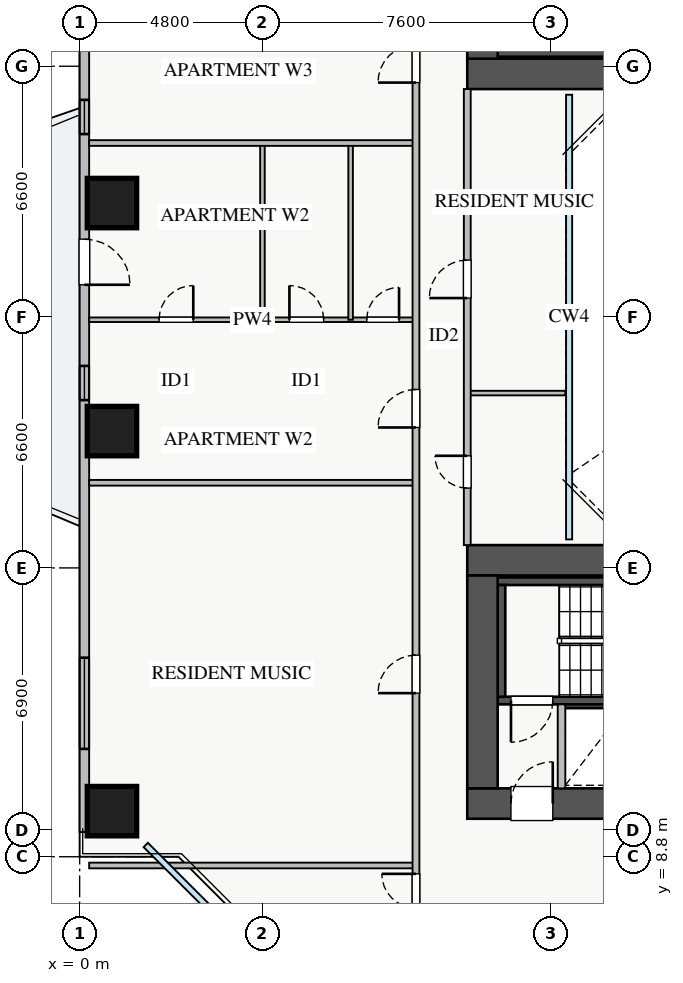
"""IFC4 building model, lengths in metres.
Left out: names, types, materials, properties, quantities, classifications, styles, units other than length and angle.
Written with IfcOpenShell. Run it as: python <this file> out.ifc"""

import sys

from ifc_helpers import new_model, si_unit, direction, frame, frame_2d, origin, origin_2d, place, context, subcontext, project, spatial, rectangle, extrude, source, transform, mapped, element, fill, save


model = new_model("IFC4")
c1 = context("Model", 3, precision=1e-05, world=origin(), true_north=direction((0.0, 1.0)))
c2 = subcontext(c1, "Body", "Model", "MODEL_VIEW")
j1 = project(units=[si_unit("LENGTHUNIT", "METRE"), si_unit("PLANEANGLEUNIT", "RADIAN")], contexts=[c1])
p1 = place(None, origin())
s1 = spatial("IfcSite", under=j1, at=p1, CompositionType="ELEMENT")
p2 = place(p1, origin())
s2 = spatial("IfcBuilding", under=s1, at=p2, CompositionType="ELEMENT")
p3 = place(p2, frame((0.0, 0.0, 79.5)))
s3 = spatial("IfcBuildingStorey", under=s2, at=p3, CompositionType="ELEMENT", Elevation=79.5)
p4 = place(p3, frame((12.68, 12.8, 0.0), z_axis=(0.0, 0.0, 1.0), x_axis=(1.0, 0.0, 0.0)))
e1 = element("IfcWall", 1, at=p4, inside=s3, PredefinedType="SHEAR", context=c2, shape_type="SweptSolid", body=[
    extrude(rectangle(XDim=1.94, YDim=0.18, at=frame_2d((0.97, 0.0))), origin(), (0.0, 0.0, 1.0), 3.07),
])
p5 = place(p3, frame((11.0, 29.95, 0.0), z_axis=(0.0, 0.0, 1.0), x_axis=(1.0, 0.0, 0.0)))
e2 = element("IfcWall", 2, at=p5, inside=s3, PredefinedType="SHEAR", context=c2, shape_type="SweptSolid", body=[
    extrude(rectangle(XDim=7.15, YDim=0.2, at=frame_2d((3.575, 0.0))), origin(), (0.0, 0.0, 1.0), 3.25),
])
p6 = place(p3, frame((11.0, 12.91, 0.0), z_axis=(0.0, 0.0, 1.0), x_axis=(1.0, 0.0, 0.0)))
e3 = element("IfcWall", 3, at=p6, inside=s3, PredefinedType="SHEAR", context=c2, shape_type="SweptSolid", body=[
    extrude(rectangle(XDim=7.15, YDim=0.2, at=frame_2d((3.575, 0.0))), origin(), (0.0, 0.0, 1.0), 3.25),
])
p7 = place(p6, frame((0.35, 0.0, 0.0)))
e4 = element("IfcOpeningElement", 4, at=p7, cuts=e3, PredefinedType="OPENING", context=c2, shape_type="SweptSolid", body=[
    extrude(rectangle(XDim=1.1, YDim=2.05, at=frame_2d((0.55, 1.025))), frame((0.0, 0.11, 0.0), z_axis=(0.0, -1.0, 0.0), x_axis=(1.0, 0.0, 0.0)), (0.0, 0.0, 1.0), 0.22),
])
p8 = place(p3, frame((11.0, 16.05, 0.0), z_axis=(0.0, 0.0, 1.0), x_axis=(1.0, 0.0, 0.0)))
e5 = element("IfcWall", 5, at=p8, inside=s3, PredefinedType="SHEAR", context=c2, shape_type="SweptSolid", body=[
    extrude(rectangle(XDim=7.15, YDim=0.2, at=frame_2d((3.575, 0.0))), origin(), (0.0, 0.0, 1.0), 3.25),
])
p9 = place(p3, frame((11.1, 13.01, 0.0), z_axis=(0.0, 0.0, 1.0), x_axis=(0.0, 1.0, 0.0)))
e6 = element("IfcWall", 6, at=p9, inside=s3, PredefinedType="SHEAR", context=c2, shape_type="SweptSolid", body=[
    extrude(rectangle(XDim=2.94, YDim=0.2, at=frame_2d((1.47, 0.0))), origin(), (0.0, 0.0, 1.0), 3.25),
])
p10 = place(p3, frame((10.2, 29.4, 0.0), z_axis=(0.0, 0.0, 1.0), x_axis=(1.0, 0.0, 0.0)))
e7 = element("IfcWall", 7, at=p10, inside=s3, PredefinedType="SHEAR", context=c2, shape_type="SweptSolid", body=[
    extrude(rectangle(XDim=17.6, YDim=0.8, at=frame_2d((8.8, 0.0))), origin(), (0.0, 0.0, 1.0), 3.25),
])
p11 = place(p3, frame((10.6, 29.8, 0.0), z_axis=(0.0, 0.0, 1.0), x_axis=(0.0, 1.0, 0.0)))
e8 = element("IfcWall", 8, at=p11, inside=s3, PredefinedType="SHEAR", context=c2, shape_type="SweptSolid", body=[
    extrude(rectangle(XDim=5.6, YDim=0.8, at=frame_2d((2.8, 0.0))), origin(), (0.0, 0.0, 1.0), 3.25),
])
p12 = place(p3, frame((10.2, 10.2, 0.0), z_axis=(0.0, 0.0, 1.0), x_axis=(1.0, 0.0, 0.0)))
e9 = element("IfcWall", 9, at=p12, inside=s3, PredefinedType="SHEAR", context=c2, shape_type="SweptSolid", body=[
    extrude(rectangle(XDim=17.6, YDim=0.8, at=frame_2d((8.8, 0.0))), origin(), (0.0, 0.0, 1.0), 3.25),
])
p13 = place(p12, frame((1.15, 0.0, 0.0)))
e10 = element("IfcOpeningElement", 10, at=p13, cuts=e9, PredefinedType="OPENING", context=c2, shape_type="SweptSolid", body=[
    extrude(rectangle(XDim=1.1, YDim=2.05, at=frame_2d((0.55, 1.025))), frame((0.0, 0.41, 0.0), z_axis=(0.0, -1.0, 0.0), x_axis=(1.0, 0.0, 0.0)), (0.0, 0.0, 1.0), 0.82),
])
p14 = place(p12, frame((8.3, 0.0, 0.0)))
e11 = element("IfcOpeningElement", 11, at=p14, cuts=e9, PredefinedType="OPENING", context=c2, shape_type="SweptSolid", body=[
    extrude(rectangle(XDim=1.1, YDim=2.05, at=frame_2d((0.55, 1.025))), frame((0.0, 0.41, 0.0), z_axis=(0.0, -1.0, 0.0), x_axis=(1.0, 0.0, 0.0)), (0.0, 0.0, 1.0), 0.82),
])
p15 = place(p12, frame((10.05, 0.0, 0.0)))
e12 = element("IfcOpeningElement", 12, at=p15, cuts=e9, PredefinedType="OPENING", context=c2, shape_type="SweptSolid", body=[
    extrude(rectangle(XDim=1.1, YDim=2.05, at=frame_2d((0.55, 1.025))), frame((0.0, 0.41, 0.0), z_axis=(0.0, -1.0, 0.0), x_axis=(1.0, 0.0, 0.0)), (0.0, 0.0, 1.0), 0.82),
])
p16 = place(p12, frame((14.74, 0.0, 0.0)))
e13 = element("IfcOpeningElement", 13, at=p16, cuts=e9, PredefinedType="OPENING", context=c2, shape_type="SweptSolid", body=[
    extrude(rectangle(XDim=1.0, YDim=2.05, at=frame_2d((0.5, 1.025))), frame((0.0, 0.41, 0.0), z_axis=(0.0, -1.0, 0.0), x_axis=(1.0, 0.0, 0.0)), (0.0, 0.0, 1.0), 0.82),
])
p17 = place(p12, frame((12.585, 0.0, 0.0)))
e14 = element("IfcOpeningElement", 14, at=p17, cuts=e9, PredefinedType="OPENING", context=c2, shape_type="SweptSolid", body=[
    extrude(rectangle(XDim=1.0, YDim=2.05, at=frame_2d((0.5, 1.025))), frame((0.0, 0.41, 0.0), z_axis=(0.0, -1.0, 0.0), x_axis=(1.0, 0.0, 0.0)), (0.0, 0.0, 1.0), 0.82),
])
p18 = place(p3, frame((10.2, 16.6, 0.0), z_axis=(0.0, 0.0, 1.0), x_axis=(1.0, 0.0, 0.0)))
e15 = element("IfcWall", 15, at=p18, inside=s3, PredefinedType="SHEAR", context=c2, shape_type="SweptSolid", body=[
    extrude(rectangle(XDim=17.6, YDim=0.8, at=frame_2d((8.8, 0.0))), origin(), (0.0, 0.0, 1.0), 3.25),
])
p19 = place(p3, frame((10.6, 10.6, 0.0), z_axis=(0.0, 0.0, 1.0), x_axis=(0.0, 1.0, 0.0)))
e16 = element("IfcWall", 16, at=p19, inside=s3, PredefinedType="SHEAR", context=c2, shape_type="SweptSolid", body=[
    extrude(rectangle(XDim=5.6, YDim=0.8, at=frame_2d((2.8, 0.0))), origin(), (0.0, 0.0, 1.0), 3.25),
])
m1 = source(origin(), c2, "Body", "SweptSolid", [
    extrude(rectangle(XDim=1.3, YDim=1.3, at=origin_2d()), origin(), (0.0, 0.0, 1.0), 3.25),
])
for number, where, z_axis, x_axis in (
    (17, (0.85, 26.0, 0.0), (0.0, 0.0, 1.0), (1.0, 0.0, 0.0)),
    (18, (0.85, 20.0, 0.0), (0.0, 0.0, 1.0), (1.0, 0.0, 0.0)),
    (19, (0.85, 10.0, 0.0), (0.0, 0.0, 1.0), (1.0, 0.0, 0.0)),
):
    element("IfcColumn", number, at=place(p3, frame(where, z_axis=z_axis, x_axis=x_axis)), inside=s3, PredefinedType="COLUMN", context=c2, shape_type="MappedRepresentation", body=[
        mapped(m1, transform((0.0, 0.0, 0.0), x_axis=(1.0, 0.0, 0.0), y_axis=(0.0, 1.0, 0.0), z_axis=(0.0, 0.0, 1.0), scale=1.0)),
    ])
p20 = place(p3, frame((0.125, 9.45, 0.0), z_axis=(0.0, 0.0, 1.0), x_axis=(0.0, 1.0, 0.0)))
e20 = element("IfcWall", 20, at=p20, inside=s3, PredefinedType="STANDARD", context=c2, shape_type="SweptSolid", body=[
    extrude(rectangle(XDim=27.1, YDim=0.25, at=frame_2d((13.55, 0.0))), origin(), (0.0, 0.0, 1.0), 2.61),
])
p21 = place(p20, frame((14.4, 0.0, 0.0)))
e21 = element("IfcOpeningElement", 21, at=p21, cuts=e20, PredefinedType="OPENING", context=c2, shape_type="SweptSolid", body=[
    extrude(rectangle(XDim=1.2, YDim=2.1, at=frame_2d((0.6, 1.05))), frame((0.0, 0.135, 0.0), z_axis=(0.0, -1.0, 0.0), x_axis=(1.0, 0.0, 0.0)), (0.0, 0.0, 1.0), 0.27),
])
p22 = place(p20, frame((2.188, 0.0, 0.9)))
e22 = element("IfcOpeningElement", 22, at=p22, cuts=e20, PredefinedType="OPENING", context=c2, shape_type="SweptSolid", body=[
    extrude(rectangle(XDim=2.4, YDim=1.48, at=frame_2d((1.2, 0.74))), frame((0.0, 0.135, 0.0), z_axis=(0.0, -1.0, 0.0), x_axis=(1.0, 0.0, 0.0)), (0.0, 0.0, 1.0), 0.27),
])
p23 = place(p20, frame((23.272, 0.0, 0.9)))
e23 = element("IfcOpeningElement", 23, at=p23, cuts=e20, PredefinedType="OPENING", context=c2, shape_type="SweptSolid", body=[
    extrude(rectangle(XDim=2.1, YDim=1.5, at=frame_2d((1.05, 0.75))), frame((0.0, 0.135, 0.0), z_axis=(0.0, -1.0, 0.0), x_axis=(1.0, 0.0, 0.0)), (0.0, 0.0, 1.0), 0.27),
])
p24 = place(p20, frame((11.365, 0.0, 0.9)))
e24 = element("IfcOpeningElement", 24, at=p24, cuts=e20, PredefinedType="OPENING", context=c2, shape_type="SweptSolid", body=[
    extrude(rectangle(XDim=0.9, YDim=1.2, at=frame_2d((0.45, 0.6))), frame((0.0, 0.135, 0.0), z_axis=(0.0, -1.0, 0.0), x_axis=(1.0, 0.0, 0.0)), (0.0, 0.0, 1.0), 0.27),
])
p25 = place(p20, frame((18.365, 0.0, 0.9)))
e25 = element("IfcOpeningElement", 25, at=p25, cuts=e20, PredefinedType="OPENING", context=c2, shape_type="SweptSolid", body=[
    extrude(rectangle(XDim=0.9, YDim=1.2, at=frame_2d((0.45, 0.6))), frame((0.0, 0.135, 0.0), z_axis=(0.0, -1.0, 0.0), x_axis=(1.0, 0.0, 0.0)), (0.0, 0.0, 1.0), 0.27),
])
p26 = place(p3, frame((12.68, 10.6, 0.0), z_axis=(0.0, 0.0, 1.0), x_axis=(0.0, 1.0, 0.0)))
e26 = element("IfcWall", 26, at=p26, inside=s3, PredefinedType="PARTITIONING", context=c2, shape_type="SweptSolid", body=[
    extrude(rectangle(XDim=2.21, YDim=0.2, at=frame_2d((1.105, 0.0))), origin(), (0.0, 0.0, 1.0), 3.07),
])
p27 = place(p3, frame((0.25, 8.57, 0.0), z_axis=(0.0, 0.0, 1.0), x_axis=(1.0, 0.0, 0.0)))
e27 = element("IfcWall", 27, at=p27, inside=s3, PredefinedType="PARTITIONING", context=c2, shape_type="SweptSolid", body=[
    extrude(rectangle(XDim=8.6, YDim=0.15, at=frame_2d((4.3, 0.0))), origin(), (0.0, 0.0, 1.0), 3.07),
])
p28 = place(p3, frame((0.25, 22.93, 0.0), z_axis=(0.0, 0.0, 1.0), x_axis=(1.0, 0.0, 0.0)))
e28 = element("IfcWall", 28, at=p28, inside=s3, PredefinedType="PLUMBINGWALL", context=c2, shape_type="SweptSolid", body=[
    extrude(rectangle(XDim=8.6, YDim=0.12, at=frame_2d((4.3, 0.0))), origin(), (0.0, 0.0, 1.0), 3.07),
])
p29 = place(p28, frame((1.84, 0.0, 0.0)))
e29 = element("IfcOpeningElement", 29, at=p29, cuts=e28, PredefinedType="OPENING", context=c2, shape_type="SweptSolid", body=[
    extrude(rectangle(XDim=0.9, YDim=2.05, at=frame_2d((0.45, 1.025))), frame((0.0, 0.07, 0.0), z_axis=(0.0, -1.0, 0.0), x_axis=(1.0, 0.0, 0.0)), (0.0, 0.0, 1.0), 0.14),
])
p30 = place(p28, frame((5.27, 0.0, 0.0)))
e30 = element("IfcOpeningElement", 30, at=p30, cuts=e28, PredefinedType="OPENING", context=c2, shape_type="SweptSolid", body=[
    extrude(rectangle(XDim=0.9, YDim=2.05, at=frame_2d((0.45, 1.025))), frame((0.0, 0.07, 0.0), z_axis=(0.0, -1.0, 0.0), x_axis=(1.0, 0.0, 0.0)), (0.0, 0.0, 1.0), 0.14),
])
p31 = place(p28, frame((7.305, 0.0, 0.0)))
e31 = element("IfcOpeningElement", 31, at=p31, cuts=e28, PredefinedType="OPENING", context=c2, shape_type="SweptSolid", body=[
    extrude(rectangle(XDim=0.85, YDim=2.05, at=frame_2d((0.425, 1.025))), frame((0.0, 0.07, 0.0), z_axis=(0.0, -1.0, 0.0), x_axis=(1.0, 0.0, 0.0)), (0.0, 0.0, 1.0), 0.14),
])
for number, where, z_axis, x_axis in (
    (32, (4.81, 22.93, 0.0), (0.0, 0.0, 1.0), (0.0, 1.0, 0.0)),
    (33, (7.13, 22.93, 0.0), (0.0, 0.0, 1.0), (0.0, 1.0, 0.0)),
):
    element("IfcWall", number, at=place(p3, frame(where, z_axis=z_axis, x_axis=x_axis)), inside=s3, PredefinedType="PLUMBINGWALL", context=c2, shape_type="SweptSolid", body=[
        extrude(rectangle(XDim=4.65, YDim=0.12, at=frame_2d((2.325, 0.0))), origin(), (0.0, 0.0, 1.0), 3.07),
    ])
for number, where, z_axis, x_axis in (
    (34, (0.25, 18.64, 0.0), (0.0, 0.0, 1.0), (1.0, 0.0, 0.0)),
    (35, (0.25, 27.58, 0.0), (0.0, 0.0, 1.0), (1.0, 0.0, 0.0)),
):
    element("IfcWall", number, at=place(p3, frame(where, z_axis=z_axis, x_axis=x_axis)), inside=s3, PredefinedType="PARTITIONING", context=c2, shape_type="SweptSolid", body=[
        extrude(rectangle(XDim=8.6, YDim=0.15, at=frame_2d((4.3, 0.0))), origin(), (0.0, 0.0, 1.0), 3.07),
    ])
p32 = place(p3, frame((8.85, 7.21, 0.0), z_axis=(0.0, 0.0, 1.0), x_axis=(0.0, 1.0, 0.0)))
e36 = element("IfcWall", 36, at=p32, inside=s3, PredefinedType="PARTITIONING", context=c2, shape_type="SweptSolid", body=[
    extrude(rectangle(XDim=31.23, YDim=0.18, at=frame_2d((15.615, 0.0))), origin(), (0.0, 0.0, 1.0), 3.07),
])
p33 = place(p32, frame((30.09, 0.0, 0.0)))
e37 = element("IfcOpeningElement", 37, at=p33, cuts=e36, PredefinedType="OPENING", context=c2, shape_type="SweptSolid", body=[
    extrude(rectangle(XDim=0.9, YDim=2.05, at=frame_2d((0.45, 1.025))), frame((0.0, 0.1, 0.0), z_axis=(0.0, -1.0, 0.0), x_axis=(1.0, 0.0, 0.0)), (0.0, 0.0, 1.0), 0.2),
])
p34 = place(p32, frame((0.24, 0.0, 0.0)))
e38 = element("IfcOpeningElement", 38, at=p34, cuts=e36, PredefinedType="OPENING", context=c2, shape_type="SweptSolid", body=[
    extrude(rectangle(XDim=0.9, YDim=2.05, at=frame_2d((0.45, 1.025))), frame((0.0, 0.1, 0.0), z_axis=(0.0, -1.0, 0.0), x_axis=(1.0, 0.0, 0.0)), (0.0, 0.0, 1.0), 0.2),
])
p35 = place(p32, frame((5.895, 0.0, 0.0)))
e39 = element("IfcOpeningElement", 39, at=p35, cuts=e36, PredefinedType="OPENING", context=c2, shape_type="SweptSolid", body=[
    extrude(rectangle(XDim=1.0, YDim=2.05, at=frame_2d((0.5, 1.025))), frame((0.0, 0.1, 0.0), z_axis=(0.0, -1.0, 0.0), x_axis=(1.0, 0.0, 0.0)), (0.0, 0.0, 1.0), 0.2),
])
p36 = place(p32, frame((12.885, 0.0, 0.0)))
e40 = element("IfcOpeningElement", 40, at=p36, cuts=e36, PredefinedType="OPENING", context=c2, shape_type="SweptSolid", body=[
    extrude(rectangle(XDim=1.0, YDim=2.05, at=frame_2d((0.5, 1.025))), frame((0.0, 0.1, 0.0), z_axis=(0.0, -1.0, 0.0), x_axis=(1.0, 0.0, 0.0)), (0.0, 0.0, 1.0), 0.2),
])
p37 = place(p32, frame((21.96, 0.0, 0.0)))
e41 = element("IfcOpeningElement", 41, at=p37, cuts=e36, PredefinedType="OPENING", context=c2, shape_type="SweptSolid", body=[
    extrude(rectangle(XDim=1.0, YDim=2.05, at=frame_2d((0.5, 1.025))), frame((0.0, 0.1, 0.0), z_axis=(0.0, -1.0, 0.0), x_axis=(1.0, 0.0, 0.0)), (0.0, 0.0, 1.0), 0.2),
])
p38 = place(p3, frame((10.2, 21.0, 0.0), z_axis=(0.0, 0.0, 1.0), x_axis=(1.0, 0.0, 0.0)))
e42 = element("IfcWall", 42, at=p38, inside=s3, PredefinedType="PLUMBINGWALL", context=c2, shape_type="SweptSolid", body=[
    extrude(rectangle(XDim=2.58, YDim=0.12, at=frame_2d((1.29, 0.0))), origin(), (0.0, 0.0, 1.0), 3.07),
])
p39 = place(p3, frame((10.2, 17.0, 0.0), z_axis=(0.0, 0.0, 1.0), x_axis=(0.0, 1.0, 0.0)))
e43 = element("IfcWall", 43, at=p39, inside=s3, PredefinedType="PARTITIONING", context=c2, shape_type="SweptSolid", body=[
    extrude(rectangle(XDim=12.0, YDim=0.18, at=frame_2d((6.0, 0.0))), origin(), (0.0, 0.0, 1.0), 3.07),
])
p40 = place(p39, frame((1.5, 0.0, 0.0)))
e44 = element("IfcOpeningElement", 44, at=p40, cuts=e43, PredefinedType="OPENING", context=c2, shape_type="SweptSolid", body=[
    extrude(rectangle(XDim=0.85, YDim=2.05, at=frame_2d((0.425, 1.025))), frame((0.0, 0.1, 0.0), z_axis=(0.0, -1.0, 0.0), x_axis=(1.0, 0.0, 0.0)), (0.0, 0.0, 1.0), 0.2),
])
p41 = place(p39, frame((6.5, 0.0, 0.0)))
e45 = element("IfcOpeningElement", 45, at=p41, cuts=e43, PredefinedType="OPENING", context=c2, shape_type="SweptSolid", body=[
    extrude(rectangle(XDim=1.0, YDim=2.05, at=frame_2d((0.5, 1.025))), frame((0.0, 0.1, 0.0), z_axis=(0.0, -1.0, 0.0), x_axis=(1.0, 0.0, 0.0)), (0.0, 0.0, 1.0), 0.2),
])
m2 = source(origin(), c2, "Body", "SweptSolid", [
    extrude(rectangle(XDim=1.2, YDim=2.1, at=frame_2d((0.6, 1.05))), frame((0.0, 0.025, 0.0), z_axis=(0.0, -1.0, 0.0), x_axis=(1.0, 0.0, 0.0)), (0.0, 0.0, 1.0), 0.05),
])
p42 = place(p21, frame((1.2, 0.0, 0.0), z_axis=(0.0, 0.0, 1.0), x_axis=(-1.0, 0.0, 0.0)))
e46 = element("IfcDoor", 46, at=p42, inside=s3, OperationType="SINGLE_SWING_LEFT", PredefinedType="DOOR", context=c2, shape_type="MappedRepresentation", body=[
    mapped(m2, transform((0.0, 0.0, 0.0), x_axis=(1.0, 0.0, 0.0), y_axis=(0.0, 1.0, 0.0), z_axis=(0.0, 0.0, 1.0), scale=1.0)),
])
fill(e21, e46)
m3 = source(origin(), c2, "Body", "SweptSolid", [
    extrude(rectangle(XDim=2.4, YDim=1.48, at=frame_2d((1.2, 0.74))), frame((0.0, 0.03, 0.0), z_axis=(0.0, -1.0, 0.0), x_axis=(1.0, 0.0, 0.0)), (0.0, 0.0, 1.0), 0.06),
])
p43 = place(p22, origin())
e47 = element("IfcWindow", 47, at=p43, inside=s3, PartitioningType="TRIPLE_PANEL_VERTICAL", PredefinedType="WINDOW", context=c2, shape_type="MappedRepresentation", body=[
    mapped(m3, transform((0.0, 0.0, 0.0), x_axis=(1.0, 0.0, 0.0), y_axis=(0.0, 1.0, 0.0), z_axis=(0.0, 0.0, 1.0), scale=1.0)),
])
fill(e22, e47)
m4 = source(origin(), c2, "Body", "SweptSolid", [
    extrude(rectangle(XDim=1.1, YDim=2.05, at=frame_2d((0.55, 1.025))), frame((0.0, 0.025, 0.0), z_axis=(0.0, -1.0, 0.0), x_axis=(1.0, 0.0, 0.0)), (0.0, 0.0, 1.0), 0.05),
])
p44 = place(p13, origin())
e48 = element("IfcDoor", 48, at=p44, inside=s3, OperationType="SINGLE_SWING_RIGHT", PredefinedType="DOOR", context=c2, shape_type="MappedRepresentation", body=[
    mapped(m4, transform((0.0, 0.0, 0.0), x_axis=(1.0, 0.0, 0.0), y_axis=(0.0, 1.0, 0.0), z_axis=(0.0, 0.0, 1.0), scale=1.0)),
])
fill(e10, e48)
p45 = place(p7, frame((1.1, 0.0, 0.0), z_axis=(0.0, 0.0, 1.0), x_axis=(-1.0, 0.0, 0.0)))
e49 = element("IfcDoor", 49, at=p45, inside=s3, OperationType="SINGLE_SWING_LEFT", PredefinedType="DOOR", context=c2, shape_type="MappedRepresentation", body=[
    mapped(m4, transform((0.0, 0.0, 0.0), x_axis=(1.0, 0.0, 0.0), y_axis=(0.0, 1.0, 0.0), z_axis=(0.0, 0.0, 1.0), scale=1.0)),
])
fill(e4, e49)
m5 = source(origin(), c2, "Body", "SweptSolid", [
    extrude(rectangle(XDim=0.9, YDim=2.05, at=frame_2d((0.45, 1.025))), frame((0.0, 0.025, 0.0), z_axis=(0.0, -1.0, 0.0), x_axis=(1.0, 0.0, 0.0)), (0.0, 0.0, 1.0), 0.05),
])
p46 = place(p29, origin())
e50 = element("IfcDoor", 50, at=p46, inside=s3, OperationType="SINGLE_SWING_RIGHT", PredefinedType="DOOR", context=c2, shape_type="MappedRepresentation", body=[
    mapped(m5, transform((0.0, 0.0, 0.0), x_axis=(1.0, 0.0, 0.0), y_axis=(0.0, 1.0, 0.0), z_axis=(0.0, 0.0, 1.0), scale=1.0)),
])
fill(e29, e50)
p47 = place(p30, origin())
e51 = element("IfcDoor", 51, at=p47, inside=s3, OperationType="SINGLE_SWING_LEFT", PredefinedType="DOOR", context=c2, shape_type="MappedRepresentation", body=[
    mapped(m5, transform((0.0, 0.0, 0.0), x_axis=(1.0, 0.0, 0.0), y_axis=(0.0, 1.0, 0.0), z_axis=(0.0, 0.0, 1.0), scale=1.0)),
])
fill(e30, e51)
m6 = source(origin(), c2, "Body", "SweptSolid", [
    extrude(rectangle(XDim=0.85, YDim=2.05, at=frame_2d((0.425, 1.025))), frame((0.0, 0.025, 0.0), z_axis=(0.0, -1.0, 0.0), x_axis=(1.0, 0.0, 0.0)), (0.0, 0.0, 1.0), 0.05),
])
p48 = place(p31, origin())
e52 = element("IfcDoor", 52, at=p48, inside=s3, OperationType="SINGLE_SWING_RIGHT", PredefinedType="DOOR", context=c2, shape_type="MappedRepresentation", body=[
    mapped(m6, transform((0.0, 0.0, 0.0), x_axis=(1.0, 0.0, 0.0), y_axis=(0.0, 1.0, 0.0), z_axis=(0.0, 0.0, 1.0), scale=1.0)),
])
fill(e31, e52)
p49 = place(p34, origin())
e53 = element("IfcDoor", 53, at=p49, inside=s3, OperationType="SINGLE_SWING_RIGHT", PredefinedType="DOOR", context=c2, shape_type="MappedRepresentation", body=[
    mapped(m5, transform((0.0, 0.0, 0.0), x_axis=(1.0, 0.0, 0.0), y_axis=(0.0, 1.0, 0.0), z_axis=(0.0, 0.0, 1.0), scale=1.0)),
])
fill(e38, e53)
m7 = source(origin(), c2, "Body", "SweptSolid", [
    extrude(rectangle(XDim=1.0, YDim=2.05, at=frame_2d((0.5, 1.025))), frame((0.0, 0.025, 0.0), z_axis=(0.0, -1.0, 0.0), x_axis=(1.0, 0.0, 0.0)), (0.0, 0.0, 1.0), 0.05),
])
p50 = place(p35, origin())
e54 = element("IfcDoor", 54, at=p50, inside=s3, OperationType="SINGLE_SWING_LEFT", PredefinedType="DOOR", context=c2, shape_type="MappedRepresentation", body=[
    mapped(m7, transform((0.0, 0.0, 0.0), x_axis=(1.0, 0.0, 0.0), y_axis=(0.0, 1.0, 0.0), z_axis=(0.0, 0.0, 1.0), scale=1.0)),
])
fill(e39, e54)
p51 = place(p36, origin())
e55 = element("IfcDoor", 55, at=p51, inside=s3, OperationType="SINGLE_SWING_LEFT", PredefinedType="DOOR", context=c2, shape_type="MappedRepresentation", body=[
    mapped(m7, transform((0.0, 0.0, 0.0), x_axis=(1.0, 0.0, 0.0), y_axis=(0.0, 1.0, 0.0), z_axis=(0.0, 0.0, 1.0), scale=1.0)),
])
fill(e40, e55)
p52 = place(p37, origin())
e56 = element("IfcDoor", 56, at=p52, inside=s3, OperationType="SINGLE_SWING_LEFT", PredefinedType="DOOR", context=c2, shape_type="MappedRepresentation", body=[
    mapped(m7, transform((0.0, 0.0, 0.0), x_axis=(1.0, 0.0, 0.0), y_axis=(0.0, 1.0, 0.0), z_axis=(0.0, 0.0, 1.0), scale=1.0)),
])
fill(e41, e56)
p53 = place(p40, origin())
e57 = element("IfcDoor", 57, at=p53, inside=s3, OperationType="SINGLE_SWING_RIGHT", PredefinedType="DOOR", context=c2, shape_type="MappedRepresentation", body=[
    mapped(m6, transform((0.0, 0.0, 0.0), x_axis=(1.0, 0.0, 0.0), y_axis=(0.0, 1.0, 0.0), z_axis=(0.0, 0.0, 1.0), scale=1.0)),
])
fill(e44, e57)
p54 = place(p41, origin())
e58 = element("IfcDoor", 58, at=p54, inside=s3, OperationType="SINGLE_SWING_LEFT", PredefinedType="DOOR", context=c2, shape_type="MappedRepresentation", body=[
    mapped(m7, transform((0.0, 0.0, 0.0), x_axis=(1.0, 0.0, 0.0), y_axis=(0.0, 1.0, 0.0), z_axis=(0.0, 0.0, 1.0), scale=1.0)),
])
fill(e45, e58)
m8 = source(origin(), c2, "Body", "SweptSolid", [
    extrude(rectangle(XDim=0.9, YDim=1.2, at=frame_2d((0.45, 0.6))), frame((0.0, 0.03, 0.0), z_axis=(0.0, -1.0, 0.0), x_axis=(1.0, 0.0, 0.0)), (0.0, 0.0, 1.0), 0.06),
])
p55 = place(p24, origin())
e59 = element("IfcWindow", 59, at=p55, inside=s3, PartitioningType="SINGLE_PANEL", PredefinedType="WINDOW", context=c2, shape_type="MappedRepresentation", body=[
    mapped(m8, transform((0.0, 0.0, 0.0), x_axis=(1.0, 0.0, 0.0), y_axis=(0.0, 1.0, 0.0), z_axis=(0.0, 0.0, 1.0), scale=1.0)),
])
fill(e24, e59)
p56 = place(p25, origin())
e60 = element("IfcWindow", 60, at=p56, inside=s3, PartitioningType="SINGLE_PANEL", PredefinedType="WINDOW", context=c2, shape_type="MappedRepresentation", body=[
    mapped(m8, transform((0.0, 0.0, 0.0), x_axis=(1.0, 0.0, 0.0), y_axis=(0.0, 1.0, 0.0), z_axis=(0.0, 0.0, 1.0), scale=1.0)),
])
fill(e25, e60)
save(model, sys.argv[1])
